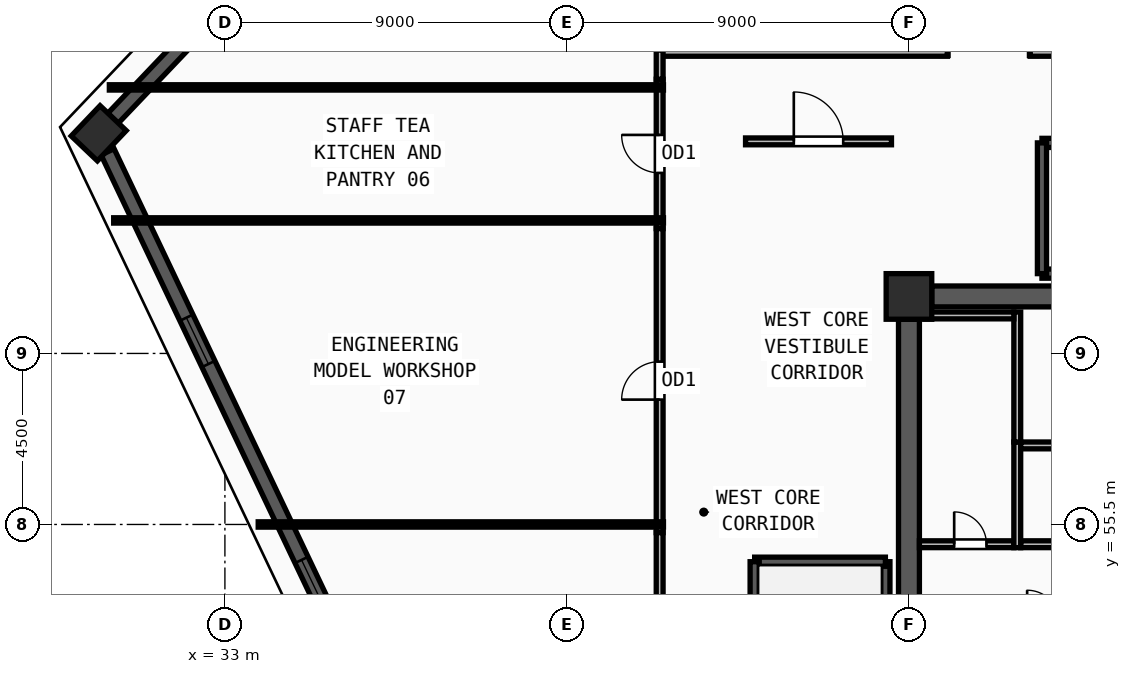
"""IFC4 building model, lengths in metres.
Left out: names, types, materials, properties, quantities, classifications, styles, units other than length and angle.
Written with IfcOpenShell. Run it as: python <this file> out.ifc"""

import sys

from ifc_helpers import new_model, si_unit, direction, frame, frame_2d, origin, origin_2d, place, context, subcontext, project, spatial, rectangle, extrude, source, transform, mapped, element, fill, save


model = new_model("IFC4")
c1 = context("Model", 3, precision=1e-05, world=origin(), true_north=direction((0.0, 1.0)))
c2 = subcontext(c1, "Body", "Model", "MODEL_VIEW")
j1 = project(units=[si_unit("LENGTHUNIT", "METRE"), si_unit("PLANEANGLEUNIT", "RADIAN")], contexts=[c1])
p1 = place(None, origin())
s1 = spatial("IfcSite", under=j1, at=p1, CompositionType="ELEMENT")
p2 = place(p1, origin())
s2 = spatial("IfcBuilding", under=s1, at=p2, CompositionType="ELEMENT")
p3 = place(p2, frame((0.0, 0.0, 297.75)))
s3 = spatial("IfcBuildingStorey", under=s2, at=p3, CompositionType="ELEMENT", Elevation=297.75)
m1 = source(origin(), c2, "Body", "SweptSolid", [
    extrude(rectangle(XDim=1.2, YDim=1.2, at=origin_2d()), origin(), (0.0, 0.0, 1.0), 3.75),
])
p4 = place(p3, frame((51.0, 61.5, 0.0), z_axis=(0.0, 0.0, 1.0), x_axis=(1.0, 0.0, 0.0)))
e1 = element("IfcColumn", 1, at=p4, inside=s3, PredefinedType="COLUMN", context=c2, shape_type="MappedRepresentation", body=[
    mapped(m1, transform((0.0, 0.0, 0.0), x_axis=(1.0, 0.0, 0.0), y_axis=(0.0, 1.0, 0.0), z_axis=(0.0, 0.0, 1.0), scale=1.0)),
])
m2 = source(origin(), c2, "Body", "SweptSolid", [
    extrude(rectangle(XDim=1.1, YDim=0.95, at=origin_2d()), origin(), (0.0, 0.0, 1.0), 3.75),
])
p5 = place(p3, frame((29.68, 65.793, 0.0), z_axis=(0.0, 0.0, 1.0), x_axis=(0.68936671806, 0.724412539946, 0.0)))
e2 = element("IfcColumn", 2, at=p5, inside=s3, PredefinedType="COLUMN", context=c2, shape_type="MappedRepresentation", body=[
    mapped(m2, transform((0.0, 0.0, 0.0), x_axis=(1.0, 0.0, 0.0), y_axis=(0.0, 1.0, 0.0), z_axis=(0.0, 0.0, 1.0), scale=1.0)),
])
p6 = place(p3, frame((32.816, 69.089, 0.0), z_axis=(0.0, 0.0, 1.0), x_axis=(-0.689291723618, -0.72448389889, 0.0)))
e3 = element("IfcWall", 3, at=p6, inside=s3, PredefinedType="SOLIDWALL", context=c2, shape_type="SweptSolid", body=[
    extrude(rectangle(XDim=4.01, YDim=0.38, at=frame_2d((2.005, 0.0))), origin(), (0.0, 0.0, 1.0), 3.57),
])
p7 = place(p3, frame((29.912, 65.305, 0.0), z_axis=(0.0, 0.0, 1.0), x_axis=(0.429331226257, -0.903147107708, 0.0)))
e4 = element("IfcWall", 4, at=p7, inside=s3, PredefinedType="SOLIDWALL", context=c2, shape_type="SweptSolid", body=[
    extrude(rectangle(XDim=22.03, YDim=0.38, at=frame_2d((11.015, 0.0))), origin(), (0.0, 0.0, 1.0), 3.57),
])
m3 = source(origin(), c2, "Body", "SweptSolid", [
    extrude(rectangle(XDim=1.35, YDim=1.85, at=frame_2d((0.675, 0.925))), frame((0.0, 0.2, 0.0), z_axis=(0.0, -1.0, 0.0), x_axis=(1.0, 0.0, 0.0)), (0.0, 0.0, 1.0), 0.4),
])
p8 = place(p7, frame((4.832, 0.0, 0.55)))
e5 = element("IfcOpeningElement", 5, at=p8, cuts=e4, PredefinedType="OPENING", context=c2, shape_type="MappedRepresentation", body=[
    mapped(m3, transform((0.0, 0.0, 0.0), x_axis=(1.0, 0.0, 0.0), y_axis=(0.0, 1.0, 0.0), z_axis=(0.0, 0.0, 1.0), scale=1.0)),
])
p9 = place(p7, frame((11.89, 0.0, 0.55)))
e6 = element("IfcOpeningElement", 6, at=p9, cuts=e4, PredefinedType="OPENING", context=c2, shape_type="MappedRepresentation", body=[
    mapped(m3, transform((0.0, 0.0, 0.0), x_axis=(1.0, 0.0, 0.0), y_axis=(0.0, 1.0, 0.0), z_axis=(0.0, 0.0, 1.0), scale=1.0)),
])
p10 = place(p7, frame((15.847, 0.0, 0.55)))
e7 = element("IfcOpeningElement", 7, at=p10, cuts=e4, PredefinedType="OPENING", context=c2, shape_type="MappedRepresentation", body=[
    mapped(m3, transform((0.0, 0.0, 0.0), x_axis=(1.0, 0.0, 0.0), y_axis=(0.0, 1.0, 0.0), z_axis=(0.0, 0.0, 1.0), scale=1.0)),
])
p11 = place(p3, frame((51.6, 61.5, 0.0), z_axis=(0.0, 0.0, 1.0), x_axis=(1.0, 0.0, 0.0)))
e8 = element("IfcWall", 8, at=p11, inside=s3, PredefinedType="SHEAR", context=c2, shape_type="SweptSolid", body=[
    extrude(rectangle(XDim=7.8, YDim=0.55, at=frame_2d((3.9, 0.0))), origin(), (0.0, 0.0, 1.0), 3.57),
])
p12 = place(p3, frame((51.0, 47.1, 0.0), z_axis=(0.0, 0.0, 1.0), x_axis=(0.0, 1.0, 0.0)))
e9 = element("IfcWall", 9, at=p12, inside=s3, PredefinedType="SHEAR", context=c2, shape_type="SweptSolid", body=[
    extrude(rectangle(XDim=13.8, YDim=0.55, at=frame_2d((6.9, 0.0))), origin(), (0.0, 0.0, 1.0), 3.57),
])
p13 = place(p3, frame((50.38, 46.7, 0.0), z_axis=(0.0, 0.0, 1.0), x_axis=(0.0, 1.0, 0.0)))
e10 = element("IfcWall", 10, at=p13, inside=s3, PredefinedType="SOLIDWALL", context=c2, shape_type="SweptSolid", body=[
    extrude(rectangle(XDim=7.82, YDim=0.24, at=frame_2d((3.91, 0.0))), origin(), (0.0, 0.0, 1.0), 3.57),
])
p14 = place(p3, frame((50.38, 54.52, 0.0), z_axis=(0.0, 0.0, 1.0), x_axis=(-1.0, 0.0, 0.0)))
e11 = element("IfcWall", 11, at=p14, inside=s3, PredefinedType="SOLIDWALL", context=c2, shape_type="SweptSolid", body=[
    extrude(rectangle(XDim=3.44, YDim=0.24, at=frame_2d((1.72, 0.0))), origin(), (0.0, 0.0, 1.0), 3.57),
])
p15 = place(p3, frame((46.94, 54.52, 0.0), z_axis=(0.0, 0.0, 1.0), x_axis=(0.0, -1.0, 0.0)))
e12 = element("IfcWall", 12, at=p15, inside=s3, PredefinedType="SOLIDWALL", context=c2, shape_type="SweptSolid", body=[
    extrude(rectangle(XDim=7.82, YDim=0.24, at=frame_2d((3.91, 0.0))), origin(), (0.0, 0.0, 1.0), 3.57),
])
m4 = source(origin(), c2, "Body", "SweptSolid", [
    extrude(rectangle(XDim=1.2, YDim=2.2, at=frame_2d((0.6, 1.1))), frame((0.0, 0.13, 0.0), z_axis=(0.0, -1.0, 0.0), x_axis=(1.0, 0.0, 0.0)), (0.0, 0.0, 1.0), 0.26),
])
p16 = place(p15, frame((6.3, 0.0, 0.0)))
e13 = element("IfcOpeningElement", 13, at=p16, cuts=e12, PredefinedType="OPENING", context=c2, shape_type="MappedRepresentation", body=[
    mapped(m4, transform((0.0, 0.0, 0.0), x_axis=(1.0, 0.0, 0.0), y_axis=(0.0, 1.0, 0.0), z_axis=(0.0, 0.0, 1.0), scale=1.0)),
])
p17 = place(p3, frame((54.5, 62.1, 0.0), z_axis=(0.0, 0.0, 1.0), x_axis=(1.0, 0.0, 0.0)))
e14 = element("IfcWall", 14, at=p17, inside=s3, PredefinedType="SOLIDWALL", context=c2, shape_type="SweptSolid", body=[
    extrude(rectangle(XDim=7.82, YDim=0.24, at=frame_2d((3.91, 0.0))), origin(), (0.0, 0.0, 1.0), 3.57),
])
p18 = place(p3, frame((62.32, 65.54, 0.0), z_axis=(0.0, 0.0, 1.0), x_axis=(-1.0, 0.0, 0.0)))
e15 = element("IfcWall", 15, at=p18, inside=s3, PredefinedType="SOLIDWALL", context=c2, shape_type="SweptSolid", body=[
    extrude(rectangle(XDim=7.82, YDim=0.24, at=frame_2d((3.91, 0.0))), origin(), (0.0, 0.0, 1.0), 3.57),
])
p19 = place(p18, frame((6.3, 0.0, 0.0)))
e16 = element("IfcOpeningElement", 16, at=p19, cuts=e15, PredefinedType="OPENING", context=c2, shape_type="MappedRepresentation", body=[
    mapped(m4, transform((0.0, 0.0, 0.0), x_axis=(1.0, 0.0, 0.0), y_axis=(0.0, 1.0, 0.0), z_axis=(0.0, 0.0, 1.0), scale=1.0)),
])
p20 = place(p3, frame((54.5, 65.54, 0.0), z_axis=(0.0, 0.0, 1.0), x_axis=(0.0, -1.0, 0.0)))
e17 = element("IfcWall", 17, at=p20, inside=s3, PredefinedType="SOLIDWALL", context=c2, shape_type="SweptSolid", body=[
    extrude(rectangle(XDim=3.44, YDim=0.24, at=frame_2d((1.72, 0.0))), origin(), (0.0, 0.0, 1.0), 3.57),
])
p21 = place(p3, frame((53.94, 54.98, 0.0), z_axis=(0.0, 0.0, 1.0), x_axis=(1.0, 0.0, 0.0)))
e18 = element("IfcWall", 18, at=p21, inside=s3, PredefinedType="PARTITIONING", context=c2, shape_type="SweptSolid", body=[
    extrude(rectangle(XDim=4.22, YDim=0.18, at=frame_2d((2.11, 0.0))), origin(), (0.0, 0.0, 1.0), 3.57),
])
m5 = source(origin(), c2, "Body", "SweptSolid", [
    extrude(rectangle(XDim=1.0, YDim=2.2, at=frame_2d((0.5, 1.1))), frame((0.0, 0.1, 0.0), z_axis=(0.0, -1.0, 0.0), x_axis=(1.0, 0.0, 0.0)), (0.0, 0.0, 1.0), 0.2),
])
p22 = place(p21, frame((1.61, 0.0, 0.0)))
e19 = element("IfcOpeningElement", 19, at=p22, cuts=e18, PredefinedType="OPENING", context=c2, shape_type="MappedRepresentation", body=[
    mapped(m5, transform((0.0, 0.0, 0.0), x_axis=(1.0, 0.0, 0.0), y_axis=(0.0, 1.0, 0.0), z_axis=(0.0, 0.0, 1.0), scale=1.0)),
])
p23 = place(p3, frame((51.275, 54.98, 0.0), z_axis=(0.0, 0.0, 1.0), x_axis=(1.0, 0.0, 0.0)))
e20 = element("IfcWall", 20, at=p23, inside=s3, PredefinedType="PARTITIONING", context=c2, shape_type="SweptSolid", body=[
    extrude(rectangle(XDim=2.485, YDim=0.18, at=frame_2d((1.243, 0.0))), origin(), (0.0, 0.0, 1.0), 3.57),
])
m6 = source(origin(), c2, "Body", "SweptSolid", [
    extrude(rectangle(XDim=0.85, YDim=2.1, at=frame_2d((0.425, 1.05))), frame((0.0, 0.1, 0.0), z_axis=(0.0, -1.0, 0.0), x_axis=(1.0, 0.0, 0.0)), (0.0, 0.0, 1.0), 0.2),
])
p24 = place(p23, frame((0.915, 0.0, 0.0)))
e21 = element("IfcOpeningElement", 21, at=p24, cuts=e20, PredefinedType="OPENING", context=c2, shape_type="MappedRepresentation", body=[
    mapped(m6, transform((0.0, 0.0, 0.0), x_axis=(1.0, 0.0, 0.0), y_axis=(0.0, 1.0, 0.0), z_axis=(0.0, 0.0, 1.0), scale=1.0)),
])
p25 = place(p3, frame((46.7, 65.58, 0.0), z_axis=(0.0, 0.0, 1.0), x_axis=(1.0, 0.0, 0.0)))
e22 = element("IfcWall", 22, at=p25, inside=s3, PredefinedType="PARTITIONING", context=c2, shape_type="SweptSolid", body=[
    extrude(rectangle(XDim=3.84, YDim=0.18, at=frame_2d((1.92, 0.0))), origin(), (0.0, 0.0, 1.0), 3.57),
])
m7 = source(origin(), c2, "Body", "SweptSolid", [
    extrude(rectangle(XDim=1.3, YDim=2.2, at=frame_2d((0.65, 1.1))), frame((0.0, 0.1, 0.0), z_axis=(0.0, -1.0, 0.0), x_axis=(1.0, 0.0, 0.0)), (0.0, 0.0, 1.0), 0.2),
])
p26 = place(p25, frame((1.27, 0.0, 0.0)))
e23 = element("IfcOpeningElement", 23, at=p26, cuts=e22, PredefinedType="OPENING", context=c2, shape_type="MappedRepresentation", body=[
    mapped(m7, transform((0.0, 0.0, 0.0), x_axis=(1.0, 0.0, 0.0), y_axis=(0.0, 1.0, 0.0), z_axis=(0.0, 0.0, 1.0), scale=1.0)),
])
p27 = place(p3, frame((54.26, 76.207, 0.0), z_axis=(0.0, 0.0, 1.0), x_axis=(0.0, -1.0, 0.0)))
e24 = element("IfcWall", 24, at=p27, inside=s3, PredefinedType="PARTITIONING", context=c2, shape_type="SweptSolid", body=[
    extrude(rectangle(XDim=8.367, YDim=0.18, at=frame_2d((4.184, 0.0))), origin(), (0.0, 0.0, 1.0), 3.57),
])
p28 = place(p27, frame((3.683, 0.0, 0.0)))
e25 = element("IfcOpeningElement", 25, at=p28, cuts=e24, PredefinedType="OPENING", context=c2, shape_type="MappedRepresentation", body=[
    mapped(m5, transform((0.0, 0.0, 0.0), x_axis=(1.0, 0.0, 0.0), y_axis=(0.0, 1.0, 0.0), z_axis=(0.0, 0.0, 1.0), scale=1.0)),
])
p29 = place(p3, frame((51.94, 67.84, 0.0), z_axis=(0.0, 0.0, 1.0), x_axis=(0.0, 1.0, 0.0)))
e26 = element("IfcWall", 26, at=p29, inside=s3, PredefinedType="PARTITIONING", context=c2, shape_type="SweptSolid", body=[
    extrude(rectangle(XDim=8.212, YDim=0.18, at=frame_2d((4.106, 0.0))), origin(), (0.0, 0.0, 1.0), 3.57),
])
m8 = source(origin(), c2, "Body", "SweptSolid", [
    extrude(rectangle(XDim=1.5, YDim=2.2, at=frame_2d((0.75, 1.1))), frame((0.0, 0.1, 0.0), z_axis=(0.0, -1.0, 0.0), x_axis=(1.0, 0.0, 0.0)), (0.0, 0.0, 1.0), 0.2),
])
p30 = place(p29, frame((3.356, 0.0, 0.0)))
e27 = element("IfcOpeningElement", 27, at=p30, cuts=e26, PredefinedType="OPENING", context=c2, shape_type="MappedRepresentation", body=[
    mapped(m8, transform((0.0, 0.0, 0.0), x_axis=(1.0, 0.0, 0.0), y_axis=(0.0, 1.0, 0.0), z_axis=(0.0, 0.0, 1.0), scale=1.0)),
])
p31 = place(p3, frame((44.44, 63.285, 0.0), z_axis=(0.0, 0.0, 1.0), x_axis=(0.0, 1.0, 0.0)))
e28 = element("IfcWall", 28, at=p31, inside=s3, PredefinedType="PARTITIONING", context=c2, shape_type="SweptSolid", body=[
    extrude(rectangle(XDim=3.93, YDim=0.18, at=frame_2d((1.965, 0.0))), origin(), (0.0, 0.0, 1.0), 3.57),
])
p32 = place(p31, frame((1.465, 0.0, 0.0)))
e29 = element("IfcOpeningElement", 29, at=p32, cuts=e28, PredefinedType="OPENING", context=c2, shape_type="MappedRepresentation", body=[
    mapped(m5, transform((0.0, 0.0, 0.0), x_axis=(1.0, 0.0, 0.0), y_axis=(0.0, 1.0, 0.0), z_axis=(0.0, 0.0, 1.0), scale=1.0)),
])
p33 = place(p3, frame((44.44, 55.285, 0.0), z_axis=(0.0, 0.0, 1.0), x_axis=(0.0, 1.0, 0.0)))
e30 = element("IfcWall", 30, at=p33, inside=s3, PredefinedType="PARTITIONING", context=c2, shape_type="SweptSolid", body=[
    extrude(rectangle(XDim=8.0, YDim=0.18, at=frame_2d((4.0, 0.0))), origin(), (0.0, 0.0, 1.0), 3.57),
])
p34 = place(p33, frame((3.5, 0.0, 0.0)))
e31 = element("IfcOpeningElement", 31, at=p34, cuts=e30, PredefinedType="OPENING", context=c2, shape_type="MappedRepresentation", body=[
    mapped(m5, transform((0.0, 0.0, 0.0), x_axis=(1.0, 0.0, 0.0), y_axis=(0.0, 1.0, 0.0), z_axis=(0.0, 0.0, 1.0), scale=1.0)),
])
p35 = place(p3, frame((44.44, 45.785, 0.0), z_axis=(0.0, 0.0, 1.0), x_axis=(0.0, 1.0, 0.0)))
e32 = element("IfcWall", 32, at=p35, inside=s3, PredefinedType="PARTITIONING", context=c2, shape_type="SweptSolid", body=[
    extrude(rectangle(XDim=9.5, YDim=0.18, at=frame_2d((4.75, 0.0))), origin(), (0.0, 0.0, 1.0), 3.261),
])
p36 = place(p35, frame((4.25, 0.0, 0.0)))
e33 = element("IfcOpeningElement", 33, at=p36, cuts=e32, PredefinedType="OPENING", context=c2, shape_type="MappedRepresentation", body=[
    mapped(m5, transform((0.0, 0.0, 0.0), x_axis=(1.0, 0.0, 0.0), y_axis=(0.0, 1.0, 0.0), z_axis=(0.0, 0.0, 1.0), scale=1.0)),
])
p37 = place(p3, frame((54.19, 67.91, 0.0), z_axis=(0.0, 0.0, 1.0), x_axis=(1.0, 0.0, 0.0)))
e34 = element("IfcWall", 34, at=p37, inside=s3, PredefinedType="PARTITIONING", context=c2, shape_type="SweptSolid", body=[
    extrude(rectangle(XDim=6.095, YDim=0.18, at=frame_2d((3.047, 0.0))), origin(), (0.0, 0.0, 1.0), 3.57),
])
p38 = place(p3, frame((44.37, 67.91, 0.0), z_axis=(0.0, 0.0, 1.0), x_axis=(1.0, 0.0, 0.0)))
e35 = element("IfcWall", 35, at=p38, inside=s3, PredefinedType="PARTITIONING", context=c2, shape_type="SweptSolid", body=[
    extrude(rectangle(XDim=7.64, YDim=0.18, at=frame_2d((3.82, 0.0))), origin(), (0.0, 0.0, 1.0), 3.57),
])
p39 = place(p3, frame((44.44, 67.215, 0.0), z_axis=(0.0, 0.0, 1.0), x_axis=(0.0, 1.0, 0.0)))
e36 = element("IfcWall", 36, at=p39, inside=s3, PredefinedType="PARTITIONING", context=c2, shape_type="SweptSolid", body=[
    extrude(rectangle(XDim=0.765, YDim=0.18, at=frame_2d((0.382, 0.0))), origin(), (0.0, 0.0, 1.0), 3.57),
])
p40 = place(p3, frame((44.54, 55.5, 0.0), z_axis=(0.0, 0.0, 1.0), x_axis=(-1.0, 0.0, 0.0)))
e37 = element("IfcWall", 37, at=p40, inside=s3, PredefinedType="PARTITIONING", context=c2, shape_type="SweptSolid", body=[
    extrude(rectangle(XDim=10.664, YDim=0.14, at=frame_2d((5.332, 0.0))), origin(), (0.0, 0.0, 1.0), 3.57),
])
p41 = place(p3, frame((44.54, 63.5, 0.0), z_axis=(0.0, 0.0, 1.0), x_axis=(-1.0, 0.0, 0.0)))
e38 = element("IfcWall", 38, at=p41, inside=s3, PredefinedType="PARTITIONING", context=c2, shape_type="SweptSolid", body=[
    extrude(rectangle(XDim=14.467, YDim=0.14, at=frame_2d((7.233, 0.0))), origin(), (0.0, 0.0, 1.0), 2.967),
])
p42 = place(p3, frame((44.54, 67.0, 0.0), z_axis=(0.0, 0.0, 1.0), x_axis=(-1.0, 0.0, 0.0)))
e39 = element("IfcWall", 39, at=p42, inside=s3, PredefinedType="PARTITIONING", context=c2, shape_type="SweptSolid", body=[
    extrude(rectangle(XDim=14.581, YDim=0.14, at=frame_2d((7.291, 0.0))), origin(), (0.0, 0.0, 1.0), 3.57),
])
p43 = place(p3, frame((53.85, 54.89, 0.0), z_axis=(0.0, 0.0, 1.0), x_axis=(0.0, 1.0, 0.0)))
e40 = element("IfcWall", 40, at=p43, inside=s3, PredefinedType="PARTITIONING", context=c2, shape_type="SweptSolid", body=[
    extrude(rectangle(XDim=2.78, YDim=0.18, at=frame_2d((1.39, 0.0))), origin(), (0.0, 0.0, 1.0), 3.57),
])
p44 = place(p3, frame((53.94, 57.58, 0.0), z_axis=(0.0, 0.0, 1.0), x_axis=(1.0, 0.0, 0.0)))
e41 = element("IfcWall", 41, at=p44, inside=s3, PredefinedType="PARTITIONING", context=c2, shape_type="SweptSolid", body=[
    extrude(rectangle(XDim=4.22, YDim=0.18, at=frame_2d((2.11, 0.0))), origin(), (0.0, 0.0, 1.0), 3.57),
])
p45 = place(p3, frame((53.85, 57.67, 0.0), z_axis=(0.0, 0.0, 1.0), x_axis=(0.0, 1.0, 0.0)))
e42 = element("IfcWall", 42, at=p45, inside=s3, PredefinedType="PARTITIONING", context=c2, shape_type="SweptSolid", body=[
    extrude(rectangle(XDim=3.42, YDim=0.18, at=frame_2d((1.71, 0.0))), origin(), (0.0, 0.0, 1.0), 3.57),
])
p46 = place(p3, frame((51.437, 61.0, 0.0), z_axis=(0.0, 0.0, 1.0), x_axis=(1.0, 0.0, 0.0)))
e43 = element("IfcWall", 43, at=p46, inside=s3, PredefinedType="PARTITIONING", context=c2, shape_type="SweptSolid", body=[
    extrude(rectangle(XDim=2.323, YDim=0.18, at=frame_2d((1.162, 0.0))), origin(), (0.0, 0.0, 1.0), 3.57),
])
m9 = source(origin(), c2, "Body", "SweptSolid", [
    extrude(rectangle(XDim=1.35, YDim=1.85, at=frame_2d((0.675, 0.925))), frame((0.0, 0.03, 0.0), z_axis=(0.0, -1.0, 0.0), x_axis=(1.0, 0.0, 0.0)), (0.0, 0.0, 1.0), 0.06),
])
p47 = place(p8, origin())
e44 = element("IfcWindow", 44, at=p47, inside=s3, PartitioningType="SINGLE_PANEL", PredefinedType="WINDOW", context=c2, shape_type="MappedRepresentation", body=[
    mapped(m9, transform((0.0, 0.0, 0.0), x_axis=(1.0, 0.0, 0.0), y_axis=(0.0, 1.0, 0.0), z_axis=(0.0, 0.0, 1.0), scale=1.0)),
])
fill(e5, e44)
p48 = place(p9, origin())
e45 = element("IfcWindow", 45, at=p48, inside=s3, PartitioningType="SINGLE_PANEL", PredefinedType="WINDOW", context=c2, shape_type="MappedRepresentation", body=[
    mapped(m9, transform((0.0, 0.0, 0.0), x_axis=(1.0, 0.0, 0.0), y_axis=(0.0, 1.0, 0.0), z_axis=(0.0, 0.0, 1.0), scale=1.0)),
])
fill(e6, e45)
m10 = source(origin(), c2, "Body", "SweptSolid", [
    extrude(rectangle(XDim=0.85, YDim=2.1, at=frame_2d((0.425, 1.05))), frame((0.0, 0.025, 0.0), z_axis=(0.0, -1.0, 0.0), x_axis=(1.0, 0.0, 0.0)), (0.0, 0.0, 1.0), 0.05),
])
p49 = place(p24, origin())
e46 = element("IfcDoor", 46, at=p49, inside=s3, OperationType="SINGLE_SWING_LEFT", PredefinedType="DOOR", context=c2, shape_type="MappedRepresentation", body=[
    mapped(m10, transform((0.0, 0.0, 0.0), x_axis=(1.0, 0.0, 0.0), y_axis=(0.0, 1.0, 0.0), z_axis=(0.0, 0.0, 1.0), scale=1.0)),
])
fill(e21, e46)
m11 = source(origin(), c2, "Body", "SweptSolid", [
    extrude(rectangle(XDim=1.3, YDim=2.2, at=frame_2d((0.65, 1.1))), frame((0.0, 0.025, 0.0), z_axis=(0.0, -1.0, 0.0), x_axis=(1.0, 0.0, 0.0)), (0.0, 0.0, 1.0), 0.05),
])
p50 = place(p26, origin())
e47 = element("IfcDoor", 47, at=p50, inside=s3, OperationType="SINGLE_SWING_LEFT", PredefinedType="DOOR", context=c2, shape_type="MappedRepresentation", body=[
    mapped(m11, transform((0.0, 0.0, 0.0), x_axis=(1.0, 0.0, 0.0), y_axis=(0.0, 1.0, 0.0), z_axis=(0.0, 0.0, 1.0), scale=1.0)),
])
fill(e23, e47)
m12 = source(origin(), c2, "Body", "SweptSolid", [
    extrude(rectangle(XDim=1.0, YDim=2.2, at=frame_2d((0.5, 1.1))), frame((0.0, 0.025, 0.0), z_axis=(0.0, -1.0, 0.0), x_axis=(1.0, 0.0, 0.0)), (0.0, 0.0, 1.0), 0.05),
])
p51 = place(p32, origin())
e48 = element("IfcDoor", 48, at=p51, inside=s3, OperationType="SINGLE_SWING_RIGHT", PredefinedType="DOOR", context=c2, shape_type="MappedRepresentation", body=[
    mapped(m12, transform((0.0, 0.0, 0.0), x_axis=(1.0, 0.0, 0.0), y_axis=(0.0, 1.0, 0.0), z_axis=(0.0, 0.0, 1.0), scale=1.0)),
])
fill(e29, e48)
p52 = place(p34, origin())
e49 = element("IfcDoor", 49, at=p52, inside=s3, OperationType="SINGLE_SWING_LEFT", PredefinedType="DOOR", context=c2, shape_type="MappedRepresentation", body=[
    mapped(m12, transform((0.0, 0.0, 0.0), x_axis=(1.0, 0.0, 0.0), y_axis=(0.0, 1.0, 0.0), z_axis=(0.0, 0.0, 1.0), scale=1.0)),
])
fill(e31, e49)
save(model, sys.argv[1])
